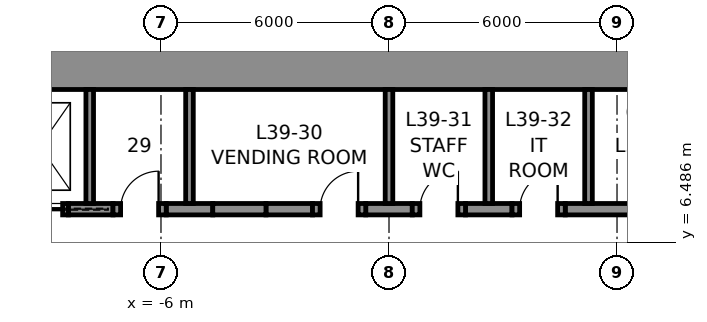
"""IFC4 building model, lengths in metres.
Left out: names, types, materials, properties, quantities, classifications, styles, units other than length and angle.
Written with IfcOpenShell. Run it as: python <this file> out.ifc"""

import sys

from ifc_helpers import new_model, si_unit, direction, frame, frame_2d, origin, place, context, subcontext, project, spatial, rectangle, extrude, element, fill, save


model = new_model("IFC4")
c1 = context("Model", 3, precision=1e-05, world=origin(), true_north=direction((0.0, 1.0)))
c2 = subcontext(c1, "Body", "Model", "MODEL_VIEW")
j1 = project(units=[si_unit("LENGTHUNIT", "METRE"), si_unit("PLANEANGLEUNIT", "RADIAN")], contexts=[c1])
p1 = place(None, origin())
s1 = spatial("IfcSite", under=j1, at=p1, CompositionType="ELEMENT")
p2 = place(p1, origin())
s2 = spatial("IfcBuilding", under=s1, at=p2, CompositionType="ELEMENT")
p3 = place(p2, frame((0.0, 0.0, 183.8)))
s3 = spatial("IfcBuildingStorey", under=s2, at=p3, CompositionType="ELEMENT", Elevation=183.8)
p4 = place(p3, frame((-12.0, 11.25, 0.0), z_axis=(0.0, 0.0, 1.0), x_axis=(1.0, 0.0, 0.0)))
e1 = element("IfcWall", 1, at=p4, inside=s3, PredefinedType="SHEAR", context=c2, shape_type="SweptSolid", body=[
    extrude(rectangle(XDim=24.0, YDim=1.5, at=frame_2d((12.0, 0.0))), origin(), (0.0, 0.0, 1.0), 4.0),
])
p5 = place(p3, frame((-8.438, 7.35, 0.0), z_axis=(0.0, 0.0, 1.0), x_axis=(1.0, 0.0, 0.0)))
e2 = element("IfcWall", 2, at=p5, inside=s3, PredefinedType="SHEAR", context=c2, shape_type="SweptSolid", body=[
    extrude(rectangle(XDim=1.175, YDim=0.3, at=frame_2d((0.587, 0.0))), origin(), (0.0, 0.0, 1.0), 4.0),
])
for number, where, z_axis, x_axis in (
    (3, (-5.863, 7.35, 0.0), (0.0, 0.0, 1.0), (1.0, 0.0, 0.0)),
    (4, (-3.238, 7.35, 0.0), (0.0, 0.0, 1.0), (1.0, 0.0, 0.0)),
    (5, (-0.613, 7.35, 0.0), (0.0, 0.0, 1.0), (1.0, 0.0, 0.0)),
    (6, (2.012, 7.35, 0.0), (0.0, 0.0, 1.0), (1.0, 0.0, 0.0)),
):
    element("IfcWall", number, at=place(p3, frame(where, z_axis=z_axis, x_axis=x_axis)), inside=s3, PredefinedType="SHEAR", context=c2, shape_type="SweptSolid", body=[
        extrude(rectangle(XDim=1.225, YDim=0.3, at=frame_2d((0.613, 0.0))), origin(), (0.0, 0.0, 1.0), 4.0),
    ])
p6 = place(p3, frame((4.637, 7.35, 0.0), z_axis=(0.0, 0.0, 1.0), x_axis=(1.0, 0.0, 0.0)))
e7 = element("IfcWall", 7, at=p6, inside=s3, PredefinedType="SHEAR", context=c2, shape_type="SweptSolid", body=[
    extrude(rectangle(XDim=1.887, YDim=0.3, at=frame_2d((0.944, 0.0))), origin(), (0.0, 0.0, 1.0), 4.0),
])
p7 = place(p3, frame((-9.938, 7.35, 0.0), z_axis=(0.0, 0.0, 1.0), x_axis=(1.0, 0.0, 0.0)))
e8 = element("IfcWall", 8, at=p7, inside=s3, PredefinedType="PARTITIONING", context=c2, shape_type="SweptSolid", body=[
    extrude(rectangle(XDim=1.5, YDim=0.3, at=frame_2d((0.75, 0.0))), origin(), (0.0, 0.0, 1.0), 4.0),
])
p8 = place(p7, frame((0.15, 0.0, 0.0)))
e9 = element("IfcOpeningElement", 9, at=p8, cuts=e8, PredefinedType="OPENING", context=c2, shape_type="SweptSolid", body=[
    extrude(rectangle(XDim=1.2, YDim=2.3, at=frame_2d((0.6, 1.15))), frame((0.0, 0.16, 0.0), z_axis=(0.0, -1.0, 0.0), x_axis=(1.0, 0.0, 0.0)), (0.0, 0.0, 1.0), 0.32),
])
p9 = place(p3, frame((-7.262, 7.35, 0.0), z_axis=(0.0, 0.0, 1.0), x_axis=(1.0, 0.0, 0.0)))
e10 = element("IfcWall", 10, at=p9, inside=s3, PredefinedType="PARTITIONING", context=c2, shape_type="SweptSolid", body=[
    extrude(rectangle(XDim=1.4, YDim=0.3, at=frame_2d((0.7, 0.0))), origin(), (0.0, 0.0, 1.0), 4.0),
])
p10 = place(p9, frame((0.2, 0.0, 0.0)))
e11 = element("IfcOpeningElement", 11, at=p10, cuts=e10, PredefinedType="OPENING", context=c2, shape_type="SweptSolid", body=[
    extrude(rectangle(XDim=1.0, YDim=2.3, at=frame_2d((0.5, 1.15))), frame((0.0, 0.16, 0.0), z_axis=(0.0, -1.0, 0.0), x_axis=(1.0, 0.0, 0.0)), (0.0, 0.0, 1.0), 0.32),
])
p11 = place(p3, frame((-4.637, 7.35, 0.0), z_axis=(0.0, 0.0, 1.0), x_axis=(1.0, 0.0, 0.0)))
e12 = element("IfcWall", 12, at=p11, inside=s3, PredefinedType="PARTITIONING", context=c2, shape_type="SweptSolid", body=[
    extrude(rectangle(XDim=1.4, YDim=0.3, at=frame_2d((0.7, 0.0))), origin(), (0.0, 0.0, 1.0), 4.0),
])
p12 = place(p3, frame((-2.012, 7.35, 0.0), z_axis=(0.0, 0.0, 1.0), x_axis=(1.0, 0.0, 0.0)))
e13 = element("IfcWall", 13, at=p12, inside=s3, PredefinedType="PARTITIONING", context=c2, shape_type="SweptSolid", body=[
    extrude(rectangle(XDim=1.4, YDim=0.3, at=frame_2d((0.7, 0.0))), origin(), (0.0, 0.0, 1.0), 4.0),
])
p13 = place(p12, frame((0.2, 0.0, 0.0)))
e14 = element("IfcOpeningElement", 14, at=p13, cuts=e13, PredefinedType="OPENING", context=c2, shape_type="SweptSolid", body=[
    extrude(rectangle(XDim=1.0, YDim=2.3, at=frame_2d((0.5, 1.15))), frame((0.0, 0.16, 0.0), z_axis=(0.0, -1.0, 0.0), x_axis=(1.0, 0.0, 0.0)), (0.0, 0.0, 1.0), 0.32),
])
p14 = place(p3, frame((0.613, 7.35, 0.0), z_axis=(0.0, 0.0, 1.0), x_axis=(1.0, 0.0, 0.0)))
e15 = element("IfcWall", 15, at=p14, inside=s3, PredefinedType="PARTITIONING", context=c2, shape_type="SweptSolid", body=[
    extrude(rectangle(XDim=1.4, YDim=0.3, at=frame_2d((0.7, 0.0))), origin(), (0.0, 0.0, 1.0), 4.0),
])
p15 = place(p14, frame((0.2, 0.0, 0.0)))
e16 = element("IfcOpeningElement", 16, at=p15, cuts=e15, PredefinedType="OPENING", context=c2, shape_type="SweptSolid", body=[
    extrude(rectangle(XDim=1.0, YDim=2.3, at=frame_2d((0.5, 1.15))), frame((0.0, 0.16, 0.0), z_axis=(0.0, -1.0, 0.0), x_axis=(1.0, 0.0, 0.0)), (0.0, 0.0, 1.0), 0.32),
])
p16 = place(p3, frame((3.238, 7.35, 0.0), z_axis=(0.0, 0.0, 1.0), x_axis=(1.0, 0.0, 0.0)))
e17 = element("IfcWall", 17, at=p16, inside=s3, PredefinedType="PARTITIONING", context=c2, shape_type="SweptSolid", body=[
    extrude(rectangle(XDim=1.4, YDim=0.3, at=frame_2d((0.7, 0.0))), origin(), (0.0, 0.0, 1.0), 4.0),
])
p17 = place(p16, frame((0.2, 0.0, 0.0)))
e18 = element("IfcOpeningElement", 18, at=p17, cuts=e17, PredefinedType="OPENING", context=c2, shape_type="SweptSolid", body=[
    extrude(rectangle(XDim=1.0, YDim=2.3, at=frame_2d((0.5, 1.15))), frame((0.0, 0.16, 0.0), z_axis=(0.0, -1.0, 0.0), x_axis=(1.0, 0.0, 0.0)), (0.0, 0.0, 1.0), 0.32),
])
for number, where, z_axis, x_axis in (
    (19, (-7.875, 7.5, 0.0), (0.0, 0.0, 1.0), (0.0, 1.0, 0.0)),
    (20, (-5.25, 7.5, 0.0), (0.0, 0.0, 1.0), (0.0, 1.0, 0.0)),
    (21, (0.0, 7.5, 0.0), (0.0, 0.0, 1.0), (0.0, 1.0, 0.0)),
    (22, (2.625, 7.5, 0.0), (0.0, 0.0, 1.0), (0.0, 1.0, 0.0)),
    (23, (5.25, 7.5, 0.0), (0.0, 0.0, 1.0), (0.0, 1.0, 0.0)),
):
    element("IfcWall", number, at=place(p3, frame(where, z_axis=z_axis, x_axis=x_axis)), inside=s3, PredefinedType="PARTITIONING", context=c2, shape_type="SweptSolid", body=[
        extrude(rectangle(XDim=3.0, YDim=0.2, at=frame_2d((1.5, 0.0))), origin(), (0.0, 0.0, 1.0), 4.0),
    ])
p18 = place(p10, origin())
e24 = element("IfcDoor", 24, at=p18, inside=s3, OperationType="SINGLE_SWING_RIGHT", PredefinedType="DOOR", context=c2, shape_type="SweptSolid", body=[
    extrude(rectangle(XDim=1.0, YDim=2.3, at=frame_2d((0.5, 1.15))), frame((0.0, 0.025, 0.0), z_axis=(0.0, -1.0, 0.0), x_axis=(1.0, 0.0, 0.0)), (0.0, 0.0, 1.0), 0.05),
])
fill(e11, e24)
p19 = place(p13, origin())
e25 = element("IfcDoor", 25, at=p19, inside=s3, OperationType="SINGLE_SWING_RIGHT", PredefinedType="DOOR", context=c2, shape_type="SweptSolid", body=[
    extrude(rectangle(XDim=1.0, YDim=2.3, at=frame_2d((0.5, 1.15))), frame((0.0, 0.025, 0.0), z_axis=(0.0, -1.0, 0.0), x_axis=(1.0, 0.0, 0.0)), (0.0, 0.0, 1.0), 0.05),
])
fill(e14, e25)
p20 = place(p15, origin())
e26 = element("IfcDoor", 26, at=p20, inside=s3, OperationType="SINGLE_SWING_RIGHT", PredefinedType="DOOR", context=c2, shape_type="SweptSolid", body=[
    extrude(rectangle(XDim=1.0, YDim=2.3, at=frame_2d((0.5, 1.15))), frame((0.0, 0.025, 0.0), z_axis=(0.0, -1.0, 0.0), x_axis=(1.0, 0.0, 0.0)), (0.0, 0.0, 1.0), 0.05),
])
fill(e16, e26)
p21 = place(p17, origin())
e27 = element("IfcDoor", 27, at=p21, inside=s3, OperationType="SINGLE_SWING_RIGHT", PredefinedType="DOOR", context=c2, shape_type="SweptSolid", body=[
    extrude(rectangle(XDim=1.0, YDim=2.3, at=frame_2d((0.5, 1.15))), frame((0.0, 0.025, 0.0), z_axis=(0.0, -1.0, 0.0), x_axis=(1.0, 0.0, 0.0)), (0.0, 0.0, 1.0), 0.05),
])
fill(e18, e27)
p22 = place(p8, frame((1.2, 0.0, 0.0), z_axis=(0.0, 0.0, 1.0), x_axis=(-1.0, 0.0, 0.0)))
e28 = element("IfcDoor", 28, at=p22, inside=s3, OperationType="SLIDING_TO_LEFT", PredefinedType="DOOR", context=c2, shape_type="SweptSolid", body=[
    extrude(rectangle(XDim=1.2, YDim=2.3, at=frame_2d((0.6, 1.15))), frame((0.0, 0.025, 0.0), z_axis=(0.0, -1.0, 0.0), x_axis=(1.0, 0.0, 0.0)), (0.0, 0.0, 1.0), 0.05),
])
fill(e9, e28)
save(model, sys.argv[1])
